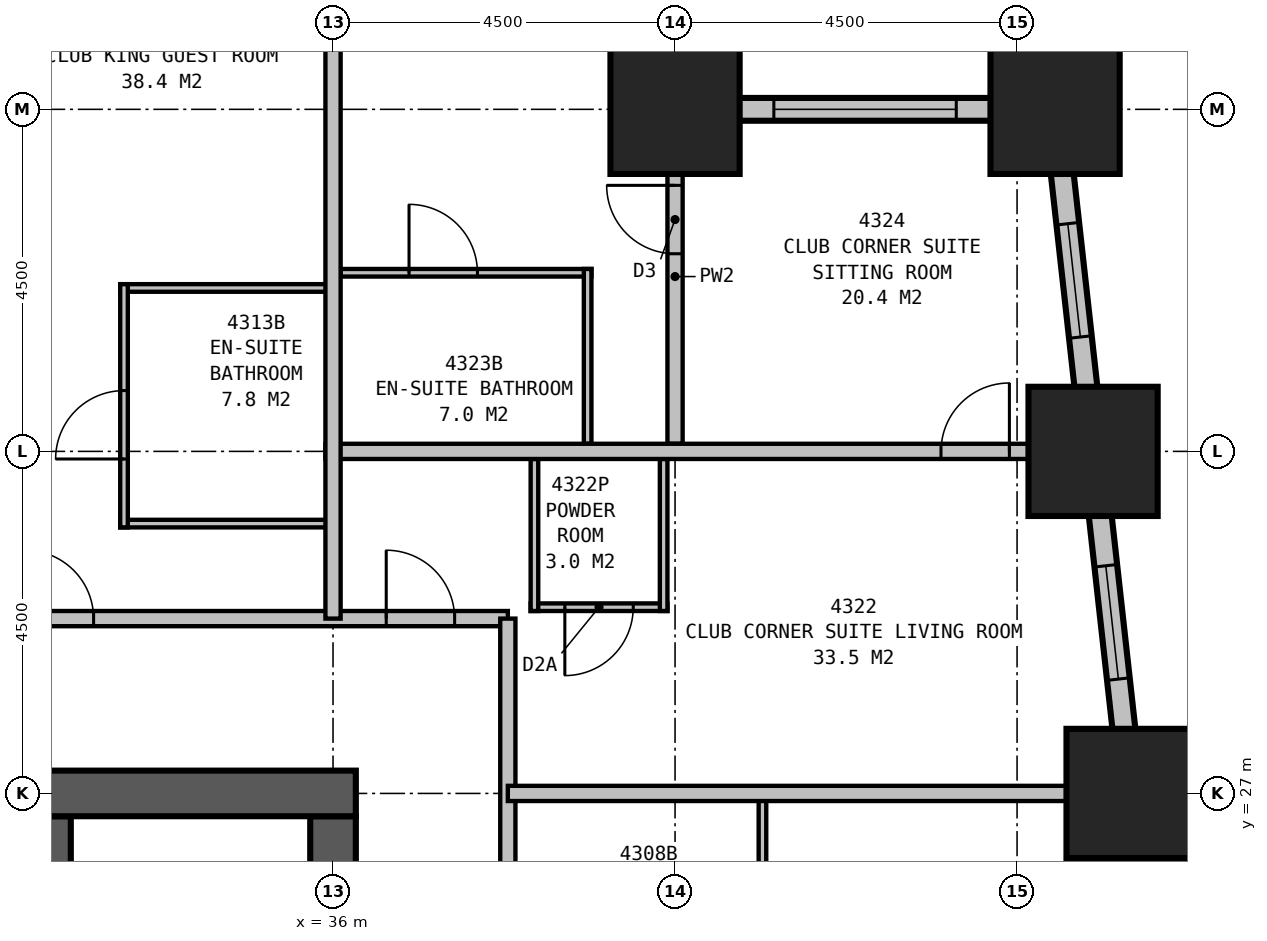
"""IFC4 building model, lengths in metres.
Left out: names, types, materials, properties, quantities, classifications, styles, units other than length and angle.
Written with IfcOpenShell. Run it as: python <this file> out.ifc"""

import sys

from ifc_helpers import new_model, si_unit, direction, frame, frame_2d, origin, origin_2d, place, context, subcontext, project, spatial, rectangle, extrude, element, fill, save


model = new_model("IFC4")
c1 = context("Model", 3, precision=1e-05, world=origin(), true_north=direction((0.0, 1.0)))
c2 = subcontext(c1, "Body", "Model", "MODEL_VIEW")
j1 = project(units=[si_unit("LENGTHUNIT", "METRE"), si_unit("PLANEANGLEUNIT", "RADIAN")], contexts=[c1])
p1 = place(None, origin())
s1 = spatial("IfcSite", under=j1, at=p1, CompositionType="ELEMENT")
p2 = place(p1, origin())
s2 = spatial("IfcBuilding", under=s1, at=p2, CompositionType="ELEMENT")
p3 = place(p2, frame((0.0, 0.0, 169.4)))
s3 = spatial("IfcBuildingStorey", under=s2, at=p3, CompositionType="ELEMENT", Elevation=169.4)
for number, where, z_axis, x_axis in (
    (1, (46.5, 27.0, 0.0), (0.0, 0.0, 1.0), (1.0, 0.0, 0.0)),
    (2, (46.0, 31.5, 0.0), (0.0, 0.0, 1.0), (1.0, 0.0, 0.0)),
    (3, (45.5, 36.0, 0.0), (0.0, 0.0, 1.0), (1.0, 0.0, 0.0)),
    (4, (40.5, 36.0, 0.0), (0.0, 0.0, 1.0), (1.0, 0.0, 0.0)),
):
    element("IfcColumn", number, at=place(p3, frame(where, z_axis=z_axis, x_axis=x_axis)), inside=s3, PredefinedType="COLUMN", context=c2, shape_type="SweptSolid", body=[
        extrude(rectangle(XDim=1.7, YDim=1.7, at=origin_2d()), origin(), (0.0, 0.0, 1.0), 3.5),
    ])
p4 = place(p3, frame((36.3, 27.0, 0.0), z_axis=(0.0, 0.0, 1.0), x_axis=(-1.0, 0.0, 0.0)))
e5 = element("IfcWall", 5, at=p4, inside=s3, PredefinedType="SHEAR", context=c2, shape_type="SweptSolid", body=[
    extrude(rectangle(XDim=23.1, YDim=0.6, at=frame_2d((11.55, 0.0))), origin(), (0.0, 0.0, 1.0), 3.5),
])
p5 = place(p4, frame((17.05, 0.0, 0.0)))
e6 = element("IfcOpeningElement", 6, at=p5, cuts=e5, PredefinedType="OPENING", context=c2, shape_type="SweptSolid", body=[
    extrude(rectangle(XDim=1.0, YDim=2.1, at=frame_2d((0.5, 1.05))), frame((0.0, 0.31, 0.0), z_axis=(0.0, -1.0, 0.0), x_axis=(1.0, 0.0, 0.0)), (0.0, 0.0, 1.0), 0.62),
])
p6 = place(p4, frame((12.05, 0.0, 0.0)))
e7 = element("IfcOpeningElement", 7, at=p6, cuts=e5, PredefinedType="OPENING", context=c2, shape_type="SweptSolid", body=[
    extrude(rectangle(XDim=1.0, YDim=2.1, at=frame_2d((0.5, 1.05))), frame((0.0, 0.31, 0.0), z_axis=(0.0, -1.0, 0.0), x_axis=(1.0, 0.0, 0.0)), (0.0, 0.0, 1.0), 0.62),
])
p7 = place(p4, frame((7.05, 0.0, 0.0)))
e8 = element("IfcOpeningElement", 8, at=p7, cuts=e5, PredefinedType="OPENING", context=c2, shape_type="SweptSolid", body=[
    extrude(rectangle(XDim=1.0, YDim=2.1, at=frame_2d((0.5, 1.05))), frame((0.0, 0.31, 0.0), z_axis=(0.0, -1.0, 0.0), x_axis=(1.0, 0.0, 0.0)), (0.0, 0.0, 1.0), 0.62),
])
p8 = place(p3, frame((32.25, 13.8, 0.0), z_axis=(0.0, 0.0, 1.0), x_axis=(0.0, 1.0, 0.0)))
e9 = element("IfcWall", 9, at=p8, inside=s3, PredefinedType="SHEAR", context=c2, shape_type="SweptSolid", body=[
    extrude(rectangle(XDim=12.9, YDim=0.6, at=frame_2d((6.45, 0.0))), origin(), (0.0, 0.0, 1.0), 3.5),
])
p9 = place(p8, frame((5.05, 0.0, 0.0), z_axis=(0.0, 0.0, 1.0), x_axis=(-1.0, 0.0, 0.0)))
e10 = element("IfcOpeningElement", 10, at=p9, cuts=e9, PredefinedType="OPENING", context=c2, shape_type="SweptSolid", body=[
    extrude(rectangle(XDim=1.2, YDim=2.1, at=frame_2d((0.6, 1.05))), frame((0.0, 0.31, 0.0), z_axis=(0.0, -1.0, 0.0), x_axis=(1.0, 0.0, 0.0)), (0.0, 0.0, 1.0), 0.62),
])
p10 = place(p3, frame((36.0, 20.0, 0.0), z_axis=(0.0, 0.0, 1.0), x_axis=(0.0, 1.0, 0.0)))
e11 = element("IfcWall", 11, at=p10, inside=s3, PredefinedType="SHEAR", context=c2, shape_type="SweptSolid", body=[
    extrude(rectangle(XDim=6.7, YDim=0.6, at=frame_2d((3.35, 0.0))), origin(), (0.0, 0.0, 1.0), 3.5),
])
p11 = place(p3, frame((49.017, 4.351, 0.0), z_axis=(0.0, 0.0, 1.0), x_axis=(-0.110433201132, 0.993883548555, 0.0)))
e12 = element("IfcWall", 12, at=p11, inside=s3, PredefinedType="STANDARD", context=c2, shape_type="SweptSolid", body=[
    extrude(rectangle(XDim=31.994, YDim=0.3, at=frame_2d((15.997, 0.0))), origin(), (0.0, 0.0, 1.0), 2.25),
])
p12 = place(p11, frame((1.664, 0.0, 0.5)))
e13 = element("IfcOpeningElement", 13, at=p12, cuts=e12, PredefinedType="OPENING", context=c2, shape_type="SweptSolid", body=[
    extrude(rectangle(XDim=1.5, YDim=1.6, at=frame_2d((0.75, 0.8))), frame((0.0, 0.16, 0.0), z_axis=(0.0, -1.0, 0.0), x_axis=(1.0, 0.0, 0.0)), (0.0, 0.0, 1.0), 0.32),
])
p13 = place(p11, frame((6.192, 0.0, 0.5)))
e14 = element("IfcOpeningElement", 14, at=p13, cuts=e12, PredefinedType="OPENING", context=c2, shape_type="SweptSolid", body=[
    extrude(rectangle(XDim=1.5, YDim=1.6, at=frame_2d((0.75, 0.8))), frame((0.0, 0.16, 0.0), z_axis=(0.0, -1.0, 0.0), x_axis=(1.0, 0.0, 0.0)), (0.0, 0.0, 1.0), 0.32),
])
p14 = place(p11, frame((10.719, 0.0, 0.5)))
e15 = element("IfcOpeningElement", 15, at=p14, cuts=e12, PredefinedType="OPENING", context=c2, shape_type="SweptSolid", body=[
    extrude(rectangle(XDim=1.5, YDim=1.6, at=frame_2d((0.75, 0.8))), frame((0.0, 0.16, 0.0), z_axis=(0.0, -1.0, 0.0), x_axis=(1.0, 0.0, 0.0)), (0.0, 0.0, 1.0), 0.32),
])
p15 = place(p11, frame((15.247, 0.0, 0.5)))
e16 = element("IfcOpeningElement", 16, at=p15, cuts=e12, PredefinedType="OPENING", context=c2, shape_type="SweptSolid", body=[
    extrude(rectangle(XDim=1.5, YDim=1.6, at=frame_2d((0.75, 0.8))), frame((0.0, 0.16, 0.0), z_axis=(0.0, -1.0, 0.0), x_axis=(1.0, 0.0, 0.0)), (0.0, 0.0, 1.0), 0.32),
])
p16 = place(p11, frame((19.775, 0.0, 0.5)))
e17 = element("IfcOpeningElement", 17, at=p16, cuts=e12, PredefinedType="OPENING", context=c2, shape_type="SweptSolid", body=[
    extrude(rectangle(XDim=1.5, YDim=1.6, at=frame_2d((0.75, 0.8))), frame((0.0, 0.16, 0.0), z_axis=(0.0, -1.0, 0.0), x_axis=(1.0, 0.0, 0.0)), (0.0, 0.0, 1.0), 0.32),
])
p17 = place(p11, frame((24.302, 0.0, 0.5)))
e18 = element("IfcOpeningElement", 18, at=p17, cuts=e12, PredefinedType="OPENING", context=c2, shape_type="SweptSolid", body=[
    extrude(rectangle(XDim=1.5, YDim=1.6, at=frame_2d((0.75, 0.8))), frame((0.0, 0.16, 0.0), z_axis=(0.0, -1.0, 0.0), x_axis=(1.0, 0.0, 0.0)), (0.0, 0.0, 1.0), 0.32),
])
p18 = place(p11, frame((28.83, 0.0, 0.5)))
e19 = element("IfcOpeningElement", 19, at=p18, cuts=e12, PredefinedType="OPENING", context=c2, shape_type="SweptSolid", body=[
    extrude(rectangle(XDim=1.5, YDim=1.6, at=frame_2d((0.75, 0.8))), frame((0.0, 0.16, 0.0), z_axis=(0.0, -1.0, 0.0), x_axis=(1.0, 0.0, 0.0)), (0.0, 0.0, 1.0), 0.32),
])
p19 = place(p3, frame((45.65, 36.0, 0.0), z_axis=(0.0, 0.0, 1.0), x_axis=(-1.0, 0.0, 0.0)))
e20 = element("IfcWall", 20, at=p19, inside=s3, PredefinedType="STANDARD", context=c2, shape_type="SweptSolid", body=[
    extrude(rectangle(XDim=5.3, YDim=0.3, at=frame_2d((2.65, 0.0))), origin(), (0.0, 0.0, 1.0), 2.25),
])
p20 = place(p19, frame((1.45, 0.0, 0.5)))
e21 = element("IfcOpeningElement", 21, at=p20, cuts=e20, PredefinedType="OPENING", context=c2, shape_type="SweptSolid", body=[
    extrude(rectangle(XDim=2.4, YDim=1.6, at=frame_2d((1.2, 0.8))), frame((0.0, 0.16, 0.0), z_axis=(0.0, -1.0, 0.0), x_axis=(1.0, 0.0, 0.0)), (0.0, 0.0, 1.0), 0.32),
])
p21 = place(p3, frame((40.5, 35.85, 0.0), z_axis=(0.0, 0.0, 1.0), x_axis=(0.0, 1.0, 0.0)))
e22 = element("IfcWall", 22, at=p21, inside=s3, PredefinedType="STANDARD", context=c2, shape_type="SweptSolid", body=[
    extrude(rectangle(XDim=4.8, YDim=0.3, at=frame_2d((2.4, 0.0))), origin(), (0.0, 0.0, 1.0), 2.25),
])
p22 = place(p21, frame((1.2, 0.0, 0.5)))
e23 = element("IfcOpeningElement", 23, at=p22, cuts=e22, PredefinedType="OPENING", context=c2, shape_type="SweptSolid", body=[
    extrude(rectangle(XDim=2.4, YDim=1.6, at=frame_2d((1.2, 0.8))), frame((0.0, 0.16, 0.0), z_axis=(0.0, -1.0, 0.0), x_axis=(1.0, 0.0, 0.0)), (0.0, 0.0, 1.0), 0.32),
])
p23 = place(p3, frame((11.2, 29.3, 0.0), z_axis=(0.0, 0.0, 1.0), x_axis=(1.0, 0.0, 0.0)))
e24 = element("IfcWall", 24, at=p23, inside=s3, PredefinedType="PARTITIONING", context=c2, shape_type="SweptSolid", body=[
    extrude(rectangle(XDim=27.1, YDim=0.2, at=frame_2d((13.55, 0.0))), origin(), (0.0, 0.0, 1.0), 3.25),
])
p24 = place(p23, frame((2.75, 0.0, 0.0)))
e25 = element("IfcOpeningElement", 25, at=p24, cuts=e24, PredefinedType="OPENING", context=c2, shape_type="SweptSolid", body=[
    extrude(rectangle(XDim=0.9, YDim=2.1, at=frame_2d((0.45, 1.05))), frame((0.0, 0.11, 0.0), z_axis=(0.0, -1.0, 0.0), x_axis=(1.0, 0.0, 0.0)), (0.0, 0.0, 1.0), 0.22),
])
p25 = place(p23, frame((9.55, 0.0, 0.0)))
e26 = element("IfcOpeningElement", 26, at=p25, cuts=e24, PredefinedType="OPENING", context=c2, shape_type="SweptSolid", body=[
    extrude(rectangle(XDim=0.9, YDim=2.1, at=frame_2d((0.45, 1.05))), frame((0.0, 0.11, 0.0), z_axis=(0.0, -1.0, 0.0), x_axis=(1.0, 0.0, 0.0)), (0.0, 0.0, 1.0), 0.22),
])
p26 = place(p23, frame((16.25, 0.0, 0.0)))
e27 = element("IfcOpeningElement", 27, at=p26, cuts=e24, PredefinedType="OPENING", context=c2, shape_type="SweptSolid", body=[
    extrude(rectangle(XDim=0.9, YDim=2.1, at=frame_2d((0.45, 1.05))), frame((0.0, 0.11, 0.0), z_axis=(0.0, -1.0, 0.0), x_axis=(1.0, 0.0, 0.0)), (0.0, 0.0, 1.0), 0.22),
])
p27 = place(p23, frame((20.75, 0.0, 0.0)))
e28 = element("IfcOpeningElement", 28, at=p27, cuts=e24, PredefinedType="OPENING", context=c2, shape_type="SweptSolid", body=[
    extrude(rectangle(XDim=0.9, YDim=2.1, at=frame_2d((0.45, 1.05))), frame((0.0, 0.11, 0.0), z_axis=(0.0, -1.0, 0.0), x_axis=(1.0, 0.0, 0.0)), (0.0, 0.0, 1.0), 0.22),
])
p28 = place(p23, frame((25.5, 0.0, 0.0)))
e29 = element("IfcOpeningElement", 29, at=p28, cuts=e24, PredefinedType="OPENING", context=c2, shape_type="SweptSolid", body=[
    extrude(rectangle(XDim=0.9, YDim=2.1, at=frame_2d((0.45, 1.05))), frame((0.0, 0.11, 0.0), z_axis=(0.0, -1.0, 0.0), x_axis=(1.0, 0.0, 0.0)), (0.0, 0.0, 1.0), 0.22),
])
p29 = place(p23, frame((0.7, 0.0, 0.0)))
e30 = element("IfcOpeningElement", 30, at=p29, cuts=e24, PredefinedType="OPENING", context=c2, shape_type="SweptSolid", body=[
    extrude(rectangle(XDim=0.9, YDim=2.1, at=frame_2d((0.45, 1.05))), frame((0.0, 0.11, 0.0), z_axis=(0.0, -1.0, 0.0), x_axis=(1.0, 0.0, 0.0)), (0.0, 0.0, 1.0), 0.22),
])
p30 = place(p3, frame((38.3, 10.6, 0.0), z_axis=(0.0, 0.0, 1.0), x_axis=(0.0, 1.0, 0.0)))
e31 = element("IfcWall", 31, at=p30, inside=s3, PredefinedType="PARTITIONING", context=c2, shape_type="SweptSolid", body=[
    extrude(rectangle(XDim=18.7, YDim=0.2, at=frame_2d((9.35, 0.0))), origin(), (0.0, 0.0, 1.0), 3.25),
])
p31 = place(p30, frame((6.95, 0.0, 0.0), z_axis=(0.0, 0.0, 1.0), x_axis=(-1.0, 0.0, 0.0)))
e32 = element("IfcOpeningElement", 32, at=p31, cuts=e31, PredefinedType="OPENING", context=c2, shape_type="SweptSolid", body=[
    extrude(rectangle(XDim=0.9, YDim=2.1, at=frame_2d((0.45, 1.05))), frame((0.0, 0.11, 0.0), z_axis=(0.0, -1.0, 0.0), x_axis=(1.0, 0.0, 0.0)), (0.0, 0.0, 1.0), 0.22),
])
p32 = place(p30, frame((11.05, 0.0, 0.0), z_axis=(0.0, 0.0, 1.0), x_axis=(-1.0, 0.0, 0.0)))
e33 = element("IfcOpeningElement", 33, at=p32, cuts=e31, PredefinedType="OPENING", context=c2, shape_type="SweptSolid", body=[
    extrude(rectangle(XDim=0.9, YDim=2.1, at=frame_2d((0.45, 1.05))), frame((0.0, 0.11, 0.0), z_axis=(0.0, -1.0, 0.0), x_axis=(1.0, 0.0, 0.0)), (0.0, 0.0, 1.0), 0.22),
])
p33 = place(p3, frame((41.65, 23.85, 0.0), z_axis=(0.0, 0.0, 1.0), x_axis=(0.0, 1.0, 0.0)))
e34 = element("IfcWall", 34, at=p33, inside=s3, PredefinedType="PLUMBINGWALL", context=c2, shape_type="SweptSolid", body=[
    extrude(rectangle(XDim=3.15, YDim=0.1, at=frame_2d((1.575, 0.0))), origin(), (0.0, 0.0, 1.0), 3.25),
])
for number, where, z_axis, x_axis in (
    (35, (33.2, 30.55, 0.0), (0.0, 0.0, 1.0), (1.0, 0.0, 0.0)),
    (36, (33.2, 33.65, 0.0), (0.0, 0.0, 1.0), (1.0, 0.0, 0.0)),
):
    element("IfcWall", number, at=place(p3, frame(where, z_axis=z_axis, x_axis=x_axis)), inside=s3, PredefinedType="PLUMBINGWALL", context=c2, shape_type="SweptSolid", body=[
        extrude(rectangle(XDim=2.8, YDim=0.1, at=frame_2d((1.4, 0.0))), origin(), (0.0, 0.0, 1.0), 3.25),
    ])
p34 = place(p3, frame((33.25, 30.5, 0.0), z_axis=(0.0, 0.0, 1.0), x_axis=(0.0, 1.0, 0.0)))
e37 = element("IfcWall", 37, at=p34, inside=s3, PredefinedType="PLUMBINGWALL", context=c2, shape_type="SweptSolid", body=[
    extrude(rectangle(XDim=3.2, YDim=0.1, at=frame_2d((1.6, 0.0))), origin(), (0.0, 0.0, 1.0), 3.25),
])
p35 = place(p34, frame((0.9, 0.0, 0.0)))
e38 = element("IfcOpeningElement", 38, at=p35, cuts=e37, PredefinedType="OPENING", context=c2, shape_type="SweptSolid", body=[
    extrude(rectangle(XDim=0.9, YDim=2.1, at=frame_2d((0.45, 1.05))), frame((0.0, 0.06, 0.0), z_axis=(0.0, -1.0, 0.0), x_axis=(1.0, 0.0, 0.0)), (0.0, 0.0, 1.0), 0.12),
])
p36 = place(p3, frame((38.3, 27.0, 0.0), z_axis=(0.0, 0.0, 1.0), x_axis=(1.0, 0.0, 0.0)))
e39 = element("IfcWall", 39, at=p36, inside=s3, PredefinedType="PARTITIONING", context=c2, shape_type="SweptSolid", body=[
    extrude(rectangle(XDim=7.977, YDim=0.2, at=frame_2d((3.988, 0.0))), origin(), (0.0, 0.0, 1.0), 1.95),
])
p37 = place(p3, frame((36.0, 29.3, 0.0), z_axis=(0.0, 0.0, 1.0), x_axis=(0.0, 1.0, 0.0)))
e40 = element("IfcWall", 40, at=p37, inside=s3, PredefinedType="PARTITIONING", context=c2, shape_type="SweptSolid", body=[
    extrude(rectangle(XDim=11.2, YDim=0.2, at=frame_2d((5.6, 0.0))), origin(), (0.0, 0.0, 1.0), 2.25),
])
p38 = place(p3, frame((35.9, 31.5, 0.0), z_axis=(0.0, 0.0, 1.0), x_axis=(1.0, 0.0, 0.0)))
e41 = element("IfcWall", 41, at=p38, inside=s3, PredefinedType="PARTITIONING", context=c2, shape_type="SweptSolid", body=[
    extrude(rectangle(XDim=10.099, YDim=0.2, at=frame_2d((5.05, 0.0))), origin(), (0.0, 0.0, 1.0), 3.25),
])
p39 = place(p38, frame((8.099, 0.0, 0.0)))
e42 = element("IfcOpeningElement", 42, at=p39, cuts=e41, PredefinedType="OPENING", context=c2, shape_type="SweptSolid", body=[
    extrude(rectangle(XDim=0.9, YDim=2.1, at=frame_2d((0.45, 1.05))), frame((0.0, 0.11, 0.0), z_axis=(0.0, -1.0, 0.0), x_axis=(1.0, 0.0, 0.0)), (0.0, 0.0, 1.0), 0.22),
])
p40 = place(p3, frame((40.35, 31.4, 0.0), z_axis=(0.0, 0.0, 1.0), x_axis=(0.0, -1.0, 0.0)))
e43 = element("IfcWall", 43, at=p40, inside=s3, PredefinedType="PLUMBINGWALL", context=c2, shape_type="SweptSolid", body=[
    extrude(rectangle(XDim=2.0, YDim=0.1, at=frame_2d((1.0, 0.0))), origin(), (0.0, 0.0, 1.0), 2.25),
])
p41 = place(p3, frame((38.65, 31.4, 0.0), z_axis=(0.0, 0.0, 1.0), x_axis=(0.0, -1.0, 0.0)))
e44 = element("IfcWall", 44, at=p41, inside=s3, PredefinedType="PLUMBINGWALL", context=c2, shape_type="SweptSolid", body=[
    extrude(rectangle(XDim=2.0, YDim=0.1, at=frame_2d((1.0, 0.0))), origin(), (0.0, 0.0, 1.0), 3.25),
])
p42 = place(p3, frame((38.6, 29.45, 0.0), z_axis=(0.0, 0.0, 1.0), x_axis=(1.0, 0.0, 0.0)))
e45 = element("IfcWall", 45, at=p42, inside=s3, PredefinedType="PLUMBINGWALL", context=c2, shape_type="SweptSolid", body=[
    extrude(rectangle(XDim=1.8, YDim=0.1, at=frame_2d((0.9, 0.0))), origin(), (0.0, 0.0, 1.0), 3.25),
])
p43 = place(p42, frame((1.35, 0.0, 0.0), z_axis=(0.0, 0.0, 1.0), x_axis=(-1.0, 0.0, 0.0)))
e46 = element("IfcOpeningElement", 46, at=p43, cuts=e45, PredefinedType="OPENING", context=c2, shape_type="SweptSolid", body=[
    extrude(rectangle(XDim=0.9, YDim=2.1, at=frame_2d((0.45, 1.05))), frame((0.0, 0.06, 0.0), z_axis=(0.0, -1.0, 0.0), x_axis=(1.0, 0.0, 0.0)), (0.0, 0.0, 1.0), 0.12),
])
p44 = place(p3, frame((40.5, 31.6, 0.0), z_axis=(0.0, 0.0, 1.0), x_axis=(0.0, 1.0, 0.0)))
e47 = element("IfcWall", 47, at=p44, inside=s3, PredefinedType="PARTITIONING", context=c2, shape_type="SweptSolid", body=[
    extrude(rectangle(XDim=4.4, YDim=0.2, at=frame_2d((2.2, 0.0))), origin(), (0.0, 0.0, 1.0), 2.25),
])
p45 = place(p44, frame((2.5, 0.0, 0.0)))
e48 = element("IfcOpeningElement", 48, at=p45, cuts=e47, PredefinedType="OPENING", context=c2, shape_type="SweptSolid", body=[
    extrude(rectangle(XDim=0.9, YDim=2.1, at=frame_2d((0.45, 1.05))), frame((0.0, 0.11, 0.0), z_axis=(0.0, -1.0, 0.0), x_axis=(1.0, 0.0, 0.0)), (0.0, 0.0, 1.0), 0.22),
])
p46 = place(p3, frame((39.35, 31.6, 0.0), z_axis=(0.0, 0.0, 1.0), x_axis=(0.0, 1.0, 0.0)))
e49 = element("IfcWall", 49, at=p46, inside=s3, PredefinedType="PLUMBINGWALL", context=c2, shape_type="SweptSolid", body=[
    extrude(rectangle(XDim=2.3, YDim=0.1, at=frame_2d((1.15, 0.0))), origin(), (0.0, 0.0, 1.0), 3.25),
])
p47 = place(p3, frame((36.1, 33.85, 0.0), z_axis=(0.0, 0.0, 1.0), x_axis=(1.0, 0.0, 0.0)))
e50 = element("IfcWall", 50, at=p47, inside=s3, PredefinedType="PLUMBINGWALL", context=c2, shape_type="SweptSolid", body=[
    extrude(rectangle(XDim=3.3, YDim=0.1, at=frame_2d((1.65, 0.0))), origin(), (0.0, 0.0, 1.0), 3.25),
])
p48 = place(p47, frame((0.9, 0.0, 0.0)))
e51 = element("IfcOpeningElement", 51, at=p48, cuts=e50, PredefinedType="OPENING", context=c2, shape_type="SweptSolid", body=[
    extrude(rectangle(XDim=0.9, YDim=2.1, at=frame_2d((0.45, 1.05))), frame((0.0, 0.06, 0.0), z_axis=(0.0, -1.0, 0.0), x_axis=(1.0, 0.0, 0.0)), (0.0, 0.0, 1.0), 0.12),
])
p49 = place(p17, origin())
e52 = element("IfcWindow", 52, at=p49, inside=s3, PartitioningType="SINGLE_PANEL", PredefinedType="WINDOW", context=c2, shape_type="SweptSolid", body=[
    extrude(rectangle(XDim=1.5, YDim=1.6, at=frame_2d((0.75, 0.8))), frame((0.0, 0.03, 0.0), z_axis=(0.0, -1.0, 0.0), x_axis=(1.0, 0.0, 0.0)), (0.0, 0.0, 1.0), 0.06),
])
fill(e18, e52)
p50 = place(p18, origin())
e53 = element("IfcWindow", 53, at=p50, inside=s3, PartitioningType="SINGLE_PANEL", PredefinedType="WINDOW", context=c2, shape_type="SweptSolid", body=[
    extrude(rectangle(XDim=1.5, YDim=1.6, at=frame_2d((0.75, 0.8))), frame((0.0, 0.03, 0.0), z_axis=(0.0, -1.0, 0.0), x_axis=(1.0, 0.0, 0.0)), (0.0, 0.0, 1.0), 0.06),
])
fill(e19, e53)
p51 = place(p20, origin())
e54 = element("IfcWindow", 54, at=p51, inside=s3, PartitioningType="SINGLE_PANEL", PredefinedType="WINDOW", context=c2, shape_type="SweptSolid", body=[
    extrude(rectangle(XDim=2.4, YDim=1.6, at=frame_2d((1.2, 0.8))), frame((0.0, 0.03, 0.0), z_axis=(0.0, -1.0, 0.0), x_axis=(1.0, 0.0, 0.0)), (0.0, 0.0, 1.0), 0.06),
])
fill(e21, e54)
p52 = place(p27, origin())
e55 = element("IfcDoor", 55, at=p52, inside=s3, OperationType="SINGLE_SWING_LEFT", PredefinedType="DOOR", context=c2, shape_type="SweptSolid", body=[
    extrude(rectangle(XDim=0.9, YDim=2.1, at=frame_2d((0.45, 1.05))), frame((0.0, 0.025, 0.0), z_axis=(0.0, -1.0, 0.0), x_axis=(1.0, 0.0, 0.0)), (0.0, 0.0, 1.0), 0.05),
])
fill(e28, e55)
p53 = place(p28, origin())
e56 = element("IfcDoor", 56, at=p53, inside=s3, OperationType="SINGLE_SWING_LEFT", PredefinedType="DOOR", context=c2, shape_type="SweptSolid", body=[
    extrude(rectangle(XDim=0.9, YDim=2.1, at=frame_2d((0.45, 1.05))), frame((0.0, 0.025, 0.0), z_axis=(0.0, -1.0, 0.0), x_axis=(1.0, 0.0, 0.0)), (0.0, 0.0, 1.0), 0.05),
])
fill(e29, e56)
p54 = place(p35, origin())
e57 = element("IfcDoor", 57, at=p54, inside=s3, OperationType="SINGLE_SWING_LEFT", PredefinedType="DOOR", context=c2, shape_type="SweptSolid", body=[
    extrude(rectangle(XDim=0.9, YDim=2.1, at=frame_2d((0.45, 1.05))), frame((0.0, 0.025, 0.0), z_axis=(0.0, -1.0, 0.0), x_axis=(1.0, 0.0, 0.0)), (0.0, 0.0, 1.0), 0.05),
])
fill(e38, e57)
p55 = place(p39, origin())
e58 = element("IfcDoor", 58, at=p55, inside=s3, OperationType="SINGLE_SWING_RIGHT", PredefinedType="DOOR", context=c2, shape_type="SweptSolid", body=[
    extrude(rectangle(XDim=0.9, YDim=2.1, at=frame_2d((0.45, 1.05))), frame((0.0, 0.025, 0.0), z_axis=(0.0, -1.0, 0.0), x_axis=(1.0, 0.0, 0.0)), (0.0, 0.0, 1.0), 0.05),
])
fill(e42, e58)
p56 = place(p43, origin())
e59 = element("IfcDoor", 59, at=p56, inside=s3, OperationType="SINGLE_SWING_RIGHT", PredefinedType="DOOR", context=c2, shape_type="SweptSolid", body=[
    extrude(rectangle(XDim=0.9, YDim=2.1, at=frame_2d((0.45, 1.05))), frame((0.0, 0.025, 0.0), z_axis=(0.0, -1.0, 0.0), x_axis=(1.0, 0.0, 0.0)), (0.0, 0.0, 1.0), 0.05),
])
fill(e46, e59)
p57 = place(p45, origin())
e60 = element("IfcDoor", 60, at=p57, inside=s3, OperationType="SINGLE_SWING_RIGHT", PredefinedType="DOOR", context=c2, shape_type="SweptSolid", body=[
    extrude(rectangle(XDim=0.9, YDim=2.1, at=frame_2d((0.45, 1.05))), frame((0.0, 0.025, 0.0), z_axis=(0.0, -1.0, 0.0), x_axis=(1.0, 0.0, 0.0)), (0.0, 0.0, 1.0), 0.05),
])
fill(e48, e60)
p58 = place(p48, origin())
e61 = element("IfcDoor", 61, at=p58, inside=s3, OperationType="SINGLE_SWING_LEFT", PredefinedType="DOOR", context=c2, shape_type="SweptSolid", body=[
    extrude(rectangle(XDim=0.9, YDim=2.1, at=frame_2d((0.45, 1.05))), frame((0.0, 0.025, 0.0), z_axis=(0.0, -1.0, 0.0), x_axis=(1.0, 0.0, 0.0)), (0.0, 0.0, 1.0), 0.05),
])
fill(e51, e61)
save(model, sys.argv[1])
